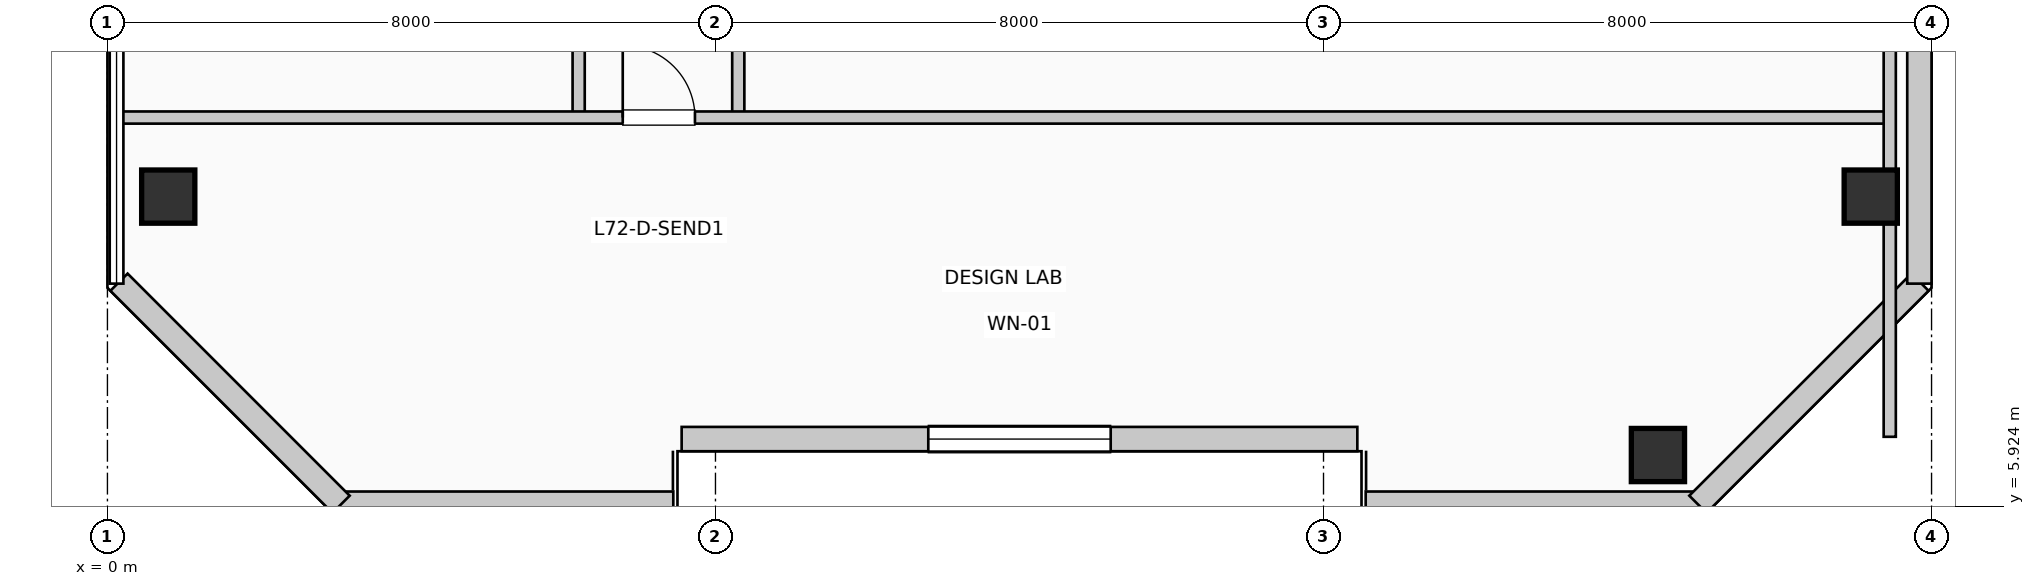
"""IFC4 building model, lengths in metres.
Left out: names, types, materials, properties, quantities, classifications, styles, units other than length and angle.
Written with IfcOpenShell. Run it as: python <this file> out.ifc"""

import sys

from ifc_helpers import new_model, si_unit, direction, frame, frame_2d, origin, origin_2d, place, context, subcontext, project, spatial, rectangle, extrude, element, fill, save


model = new_model("IFC4")
c1 = context("Model", 3, precision=1e-05, world=origin(), true_north=direction((0.0, 1.0)))
c2 = subcontext(c1, "Body", "Model", "MODEL_VIEW")
j1 = project(units=[si_unit("LENGTHUNIT", "METRE"), si_unit("PLANEANGLEUNIT", "RADIAN")], contexts=[c1])
p1 = place(None, origin())
s1 = spatial("IfcSite", under=j1, at=p1, CompositionType="ELEMENT")
p2 = place(p1, origin())
s2 = spatial("IfcBuilding", under=s1, at=p2, CompositionType="ELEMENT")
p3 = place(p2, frame((0.0, 0.0, 296.01)))
s3 = spatial("IfcBuildingStorey", under=s2, at=p3, CompositionType="ELEMENT", Elevation=296.01)
for number, where, z_axis, x_axis in (
    (1, (0.8, 10.0, 0.0), (0.0, 0.0, 1.0), (1.0, 0.0, 0.0)),
    (2, (20.4, 6.6, 0.0), (0.0, 0.0, 1.0), (1.0, 0.0, 0.0)),
    (3, (23.2, 10.0, 0.0), (0.0, 0.0, 1.0), (1.0, 0.0, 0.0)),
):
    element("IfcColumn", number, at=place(p3, frame(where, z_axis=z_axis, x_axis=x_axis)), inside=s3, PredefinedType="COLUMN", context=c2, shape_type="SweptSolid", body=[
        extrude(rectangle(XDim=0.7, YDim=0.7, at=origin_2d()), origin(), (0.0, 0.0, 1.0), 3.96),
    ])
p4 = place(p3, frame((3.055, 5.96, 0.0), z_axis=(0.0, 0.0, 1.0), x_axis=(1.0, 0.0, 0.0)))
e4 = element("IfcWall", 4, at=p4, inside=s3, PredefinedType="SOLIDWALL", context=c2, shape_type="SweptSolid", body=[
    extrude(rectangle(XDim=4.39, YDim=0.32, at=frame_2d((2.195, 0.0))), origin(), (0.0, 0.0, 1.0), 3.74),
])
p5 = place(p3, frame((7.555, 6.81, 0.0), z_axis=(0.0, 0.0, 1.0), x_axis=(1.0, 0.0, 0.0)))
e5 = element("IfcWall", 5, at=p5, inside=s3, PredefinedType="SOLIDWALL", context=c2, shape_type="SweptSolid", body=[
    extrude(rectangle(XDim=8.89, YDim=0.32, at=frame_2d((4.445, 0.0))), origin(), (0.0, 0.0, 1.0), 3.74),
])
p6 = place(p5, frame((3.245, 0.0, 0.85)))
e6 = element("IfcOpeningElement", 6, at=p6, cuts=e5, PredefinedType="OPENING", context=c2, shape_type="SweptSolid", body=[
    extrude(rectangle(XDim=2.4, YDim=2.05, at=frame_2d((1.2, 1.025))), frame((0.0, 0.17, 0.0), z_axis=(0.0, -1.0, 0.0), x_axis=(1.0, 0.0, 0.0)), (0.0, 0.0, 1.0), 0.34),
])
p7 = place(p3, frame((16.555, 5.96, 0.0), z_axis=(0.0, 0.0, 1.0), x_axis=(1.0, 0.0, 0.0)))
e7 = element("IfcWall", 7, at=p7, inside=s3, PredefinedType="SOLIDWALL", context=c2, shape_type="SweptSolid", body=[
    extrude(rectangle(XDim=4.39, YDim=0.32, at=frame_2d((2.195, 0.0))), origin(), (0.0, 0.0, 1.0), 3.74),
])
p8 = place(p3, frame((20.926, 5.952, 0.0), z_axis=(0.0, 0.0, 1.0), x_axis=(0.707077242712, 0.707136318428, 0.0)))
e8 = element("IfcWall", 8, at=p8, inside=s3, PredefinedType="SOLIDWALL", context=c2, shape_type="SweptSolid", body=[
    extrude(rectangle(XDim=4.133, YDim=0.32, at=frame_2d((2.066, 0.0))), origin(), (0.0, 0.0, 1.0), 3.74),
])
p9 = place(p3, frame((23.84, 8.855, 0.0), z_axis=(0.0, 0.0, 1.0), x_axis=(0.0, 1.0, 0.0)))
e9 = element("IfcWall", 9, at=p9, inside=s3, PredefinedType="SOLIDWALL", context=c2, shape_type="SweptSolid", body=[
    extrude(rectangle(XDim=14.09, YDim=0.32, at=frame_2d((7.045, 0.0))), origin(), (0.0, 0.0, 1.0), 3.74),
])
p10 = place(p3, frame((0.152, 8.874, 0.0), z_axis=(0.0, 0.0, 1.0), x_axis=(0.707077242712, -0.707136318428, 0.0)))
e10 = element("IfcWall", 10, at=p10, inside=s3, PredefinedType="SOLIDWALL", context=c2, shape_type="SweptSolid", body=[
    extrude(rectangle(XDim=4.133, YDim=0.32, at=frame_2d((2.066, 0.0))), origin(), (0.0, 0.0, 1.0), 3.74),
])
p11 = place(p3, frame((6.2, 11.04, 0.0), z_axis=(0.0, 0.0, 1.0), x_axis=(0.0, 1.0, 0.0)))
e11 = element("IfcWall", 11, at=p11, inside=s3, PredefinedType="PARTITIONING", context=c2, shape_type="SweptSolid", body=[
    extrude(rectangle(XDim=18.36, YDim=0.16, at=frame_2d((9.18, 0.0))), origin(), (0.0, 0.0, 1.0), 3.74),
])
p12 = place(p11, frame((3.413, 0.0, 0.0), z_axis=(0.0, 0.0, 1.0), x_axis=(-1.0, 0.0, 0.0)))
e12 = element("IfcOpeningElement", 12, at=p12, cuts=e11, PredefinedType="OPENING", context=c2, shape_type="SweptSolid", body=[
    extrude(rectangle(XDim=0.95, YDim=2.15, at=frame_2d((0.475, 1.075))), frame((0.0, 0.09, 0.0), z_axis=(0.0, -1.0, 0.0), x_axis=(1.0, 0.0, 0.0)), (0.0, 0.0, 1.0), 0.18),
])
p13 = place(p11, frame((9.38, 0.0, 0.0), z_axis=(0.0, 0.0, 1.0), x_axis=(-1.0, 0.0, 0.0)))
e13 = element("IfcOpeningElement", 13, at=p13, cuts=e11, PredefinedType="OPENING", context=c2, shape_type="SweptSolid", body=[
    extrude(rectangle(XDim=0.95, YDim=2.15, at=frame_2d((0.475, 1.075))), frame((0.0, 0.09, 0.0), z_axis=(0.0, -1.0, 0.0), x_axis=(1.0, 0.0, 0.0)), (0.0, 0.0, 1.0), 0.18),
])
p14 = place(p11, frame((15.622, 0.0, 0.0), z_axis=(0.0, 0.0, 1.0), x_axis=(-1.0, 0.0, 0.0)))
e14 = element("IfcOpeningElement", 14, at=p14, cuts=e11, PredefinedType="OPENING", context=c2, shape_type="SweptSolid", body=[
    extrude(rectangle(XDim=0.95, YDim=2.15, at=frame_2d((0.475, 1.075))), frame((0.0, 0.09, 0.0), z_axis=(0.0, -1.0, 0.0), x_axis=(1.0, 0.0, 0.0)), (0.0, 0.0, 1.0), 0.18),
])
p15 = place(p3, frame((8.3, 11.04, 0.0), z_axis=(0.0, 0.0, 1.0), x_axis=(0.0, 1.0, 0.0)))
e15 = element("IfcWall", 15, at=p15, inside=s3, PredefinedType="PARTITIONING", context=c2, shape_type="SweptSolid", body=[
    extrude(rectangle(XDim=18.36, YDim=0.16, at=frame_2d((9.18, 0.0))), origin(), (0.0, 0.0, 1.0), 3.74),
])
p16 = place(p15, frame((1.545, 0.0, 0.0)))
e16 = element("IfcOpeningElement", 16, at=p16, cuts=e15, PredefinedType="OPENING", context=c2, shape_type="SweptSolid", body=[
    extrude(rectangle(XDim=0.95, YDim=2.15, at=frame_2d((0.475, 1.075))), frame((0.0, 0.09, 0.0), z_axis=(0.0, -1.0, 0.0), x_axis=(1.0, 0.0, 0.0)), (0.0, 0.0, 1.0), 0.18),
])
p17 = place(p15, frame((5.951, 0.0, 0.0)))
e17 = element("IfcOpeningElement", 17, at=p17, cuts=e15, PredefinedType="OPENING", context=c2, shape_type="SweptSolid", body=[
    extrude(rectangle(XDim=0.95, YDim=2.15, at=frame_2d((0.475, 1.075))), frame((0.0, 0.09, 0.0), z_axis=(0.0, -1.0, 0.0), x_axis=(1.0, 0.0, 0.0)), (0.0, 0.0, 1.0), 0.18),
])
p18 = place(p15, frame((10.908, 0.0, 0.0)))
e18 = element("IfcOpeningElement", 18, at=p18, cuts=e15, PredefinedType="OPENING", context=c2, shape_type="SweptSolid", body=[
    extrude(rectangle(XDim=0.95, YDim=2.15, at=frame_2d((0.475, 1.075))), frame((0.0, 0.09, 0.0), z_axis=(0.0, -1.0, 0.0), x_axis=(1.0, 0.0, 0.0)), (0.0, 0.0, 1.0), 0.18),
])
p19 = place(p15, frame((15.682, 0.0, 0.0)))
e19 = element("IfcOpeningElement", 19, at=p19, cuts=e15, PredefinedType="OPENING", context=c2, shape_type="SweptSolid", body=[
    extrude(rectangle(XDim=0.95, YDim=2.15, at=frame_2d((0.475, 1.075))), frame((0.0, 0.09, 0.0), z_axis=(0.0, -1.0, 0.0), x_axis=(1.0, 0.0, 0.0)), (0.0, 0.0, 1.0), 0.18),
])
p20 = place(p3, frame((0.19, 11.04, 0.0), z_axis=(0.0, 0.0, 1.0), x_axis=(1.0, 0.0, 0.0)))
e20 = element("IfcWall", 20, at=p20, inside=s3, PredefinedType="PARTITIONING", context=c2, shape_type="SweptSolid", body=[
    extrude(rectangle(XDim=23.26, YDim=0.16, at=frame_2d((11.63, 0.0))), origin(), (0.0, 0.0, 1.0), 3.74),
])
p21 = place(p20, frame((6.59, 0.0, 0.0)))
e21 = element("IfcOpeningElement", 21, at=p21, cuts=e20, PredefinedType="OPENING", context=c2, shape_type="SweptSolid", body=[
    extrude(rectangle(XDim=0.95, YDim=2.15, at=frame_2d((0.475, 1.075))), frame((0.0, 0.09, 0.0), z_axis=(0.0, -1.0, 0.0), x_axis=(1.0, 0.0, 0.0)), (0.0, 0.0, 1.0), 0.18),
])
p22 = place(p3, frame((23.45, 6.84, 0.0), z_axis=(0.0, 0.0, 1.0), x_axis=(0.0, 1.0, 0.0)))
e22 = element("IfcWall", 22, at=p22, inside=s3, PredefinedType="PARTITIONING", context=c2, shape_type="SweptSolid", body=[
    extrude(rectangle(XDim=22.56, YDim=0.16, at=frame_2d((11.28, 0.0))), origin(), (0.0, 0.0, 1.0), 3.175),
])
p23 = place(p6, origin())
e23 = element("IfcWindow", 23, at=p23, inside=s3, PartitioningType="SINGLE_PANEL", PredefinedType="WINDOW", context=c2, shape_type="SweptSolid", body=[
    extrude(rectangle(XDim=2.4, YDim=2.05, at=frame_2d((1.2, 1.025))), frame((0.0, 0.03, 0.0), z_axis=(0.0, -1.0, 0.0), x_axis=(1.0, 0.0, 0.0)), (0.0, 0.0, 1.0), 0.06),
])
fill(e6, e23)
p24 = place(p21, origin())
e24 = element("IfcDoor", 24, at=p24, inside=s3, OperationType="SINGLE_SWING_LEFT", PredefinedType="DOOR", context=c2, shape_type="SweptSolid", body=[
    extrude(rectangle(XDim=0.95, YDim=2.15, at=frame_2d((0.475, 1.075))), frame((0.0, 0.025, 0.0), z_axis=(0.0, -1.0, 0.0), x_axis=(1.0, 0.0, 0.0)), (0.0, 0.0, 1.0), 0.05),
])
fill(e21, e24)
save(model, sys.argv[1])
